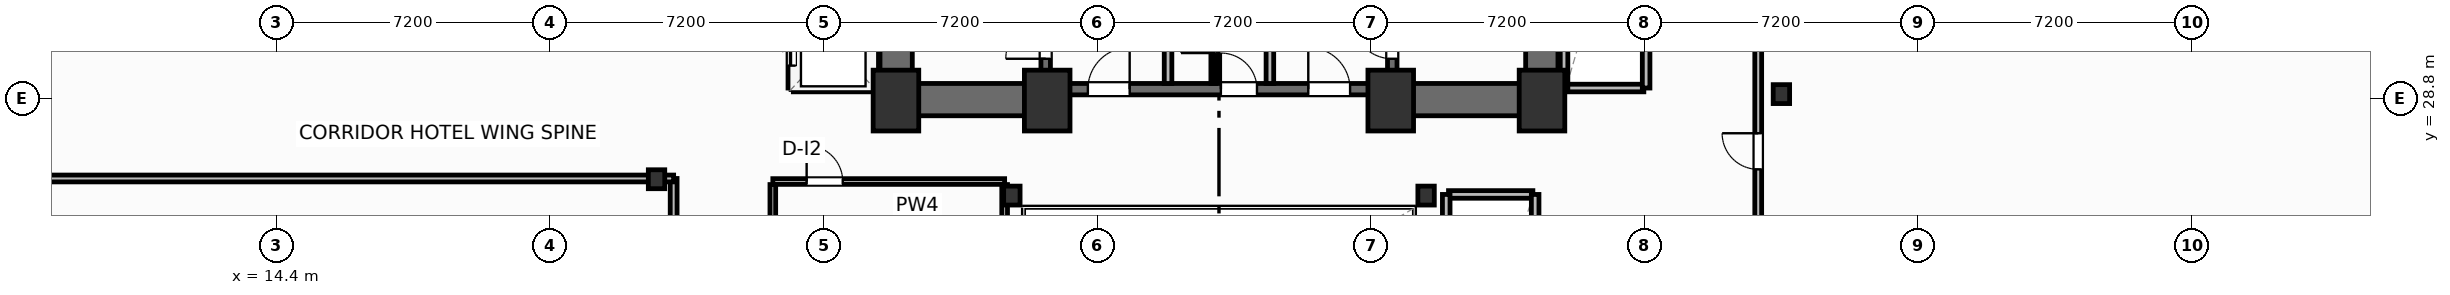
"""IFC4 building model, lengths in metres.
Left out: names, types, materials, properties, quantities, classifications, styles, units other than length and angle.
Written with IfcOpenShell. Run it as: python <this file> out.ifc"""

import sys

from ifc_helpers import new_model, si_unit, direction, frame, frame_2d, origin, origin_2d, place, context, subcontext, project, spatial, rectangle, i_section, extrude, element, fill, save


model = new_model("IFC4")
c1 = context("Model", 3, precision=1e-05, world=origin(), true_north=direction((0.0, 1.0)))
c2 = subcontext(c1, "Body", "Model", "MODEL_VIEW")
j1 = project(units=[si_unit("LENGTHUNIT", "METRE"), si_unit("PLANEANGLEUNIT", "RADIAN")], contexts=[c1])
p1 = place(None, origin())
s1 = spatial("IfcSite", under=j1, at=p1, CompositionType="ELEMENT")
p2 = place(p1, origin())
s2 = spatial("IfcBuilding", under=s1, at=p2, CompositionType="ELEMENT")
p3 = place(p2, frame((0.0, 0.0, 34.4)))
s3 = spatial("IfcBuildingStorey", under=s2, at=p3, CompositionType="ELEMENT", Elevation=34.4)
for number, where, z_axis, x_axis in (
    (1, (30.7, 28.75, 0.0), (0.0, 0.0, 1.0), (1.0, 0.0, 0.0)),
    (2, (34.68, 28.75, 0.0), (0.0, 0.0, 1.0), (1.0, 0.0, 0.0)),
    (3, (43.72, 28.75, 0.0), (0.0, 0.0, 1.0), (1.0, 0.0, 0.0)),
    (4, (47.7, 28.75, 0.0), (0.0, 0.0, 1.0), (1.0, 0.0, 0.0)),
):
    element("IfcColumn", number, at=place(p3, frame(where, z_axis=z_axis, x_axis=x_axis)), inside=s3, PredefinedType="COLUMN", context=c2, shape_type="SweptSolid", body=[
        extrude(rectangle(XDim=1.2, YDim=1.6, at=origin_2d()), origin(), (0.0, 0.0, 1.0), 3.7),
    ])
for number, where, z_axis, x_axis in (
    (5, (33.75, 26.25, 0.0), (0.0, 0.0, 1.0), (1.0, 0.0, 0.0)),
    (6, (44.65, 26.25, 0.0), (0.0, 0.0, 1.0), (1.0, 0.0, 0.0)),
    (7, (24.4, 26.68, 0.0), (0.0, 0.0, 1.0), (1.0, 0.0, 0.0)),
    (8, (54.0, 28.92, 0.0), (0.0, 0.0, 1.0), (1.0, 0.0, 0.0)),
):
    element("IfcColumn", number, at=place(p3, frame(where, z_axis=z_axis, x_axis=x_axis)), inside=s3, PredefinedType="COLUMN", context=c2, shape_type="SweptSolid", body=[
        extrude(i_section(OverallWidth=0.432, OverallDepth=0.498, WebThickness=0.056, FlangeThickness=0.089, FilletRadius=0.025, at=origin_2d()), origin(), (0.0, 0.0, 1.0), 3.7),
    ])
for number, where, z_axis, x_axis in (
    (9, (30.705, 29.2, 0.0), (0.0, 0.0, 1.0), (0.0, 1.0, 0.0)),
    (10, (47.695, 29.2, 0.0), (0.0, 0.0, 1.0), (0.0, 1.0, 0.0)),
):
    element("IfcWall", number, at=place(p3, frame(where, z_axis=z_axis, x_axis=x_axis)), inside=s3, PredefinedType="SHEAR", context=c2, shape_type="SweptSolid", body=[
        extrude(rectangle(XDim=9.22, YDim=0.85, at=frame_2d((4.61, 0.0))), origin(), (0.0, 0.0, 1.0), 3.45),
    ])
for number, where, z_axis, x_axis in (
    (11, (30.28, 28.775, 0.0), (0.0, 0.0, 1.0), (1.0, 0.0, 0.0)),
    (12, (43.6, 28.775, 0.0), (0.0, 0.0, 1.0), (1.0, 0.0, 0.0)),
):
    element("IfcWall", number, at=place(p3, frame(where, z_axis=z_axis, x_axis=x_axis)), inside=s3, PredefinedType="SHEAR", context=c2, shape_type="SweptSolid", body=[
        extrude(rectangle(XDim=4.52, YDim=0.85, at=frame_2d((2.26, 0.0))), origin(), (0.0, 0.0, 1.0), 3.45),
    ])
p4 = place(p3, frame((34.8, 29.05, 0.0), z_axis=(0.0, 0.0, 1.0), x_axis=(1.0, 0.0, 0.0)))
e13 = element("IfcWall", 13, at=p4, inside=s3, PredefinedType="SHEAR", context=c2, shape_type="SweptSolid", body=[
    extrude(rectangle(XDim=8.8, YDim=0.3, at=frame_2d((4.4, 0.0))), origin(), (0.0, 0.0, 1.0), 3.45),
])
p5 = place(p4, frame((0.95, 0.0, 0.0)))
e14 = element("IfcOpeningElement", 14, at=p5, cuts=e13, PredefinedType="OPENING", context=c2, shape_type="SweptSolid", body=[
    extrude(rectangle(XDim=1.1, YDim=2.15, at=frame_2d((0.55, 1.075))), frame((0.0, 0.16, 0.0), z_axis=(0.0, -1.0, 0.0), x_axis=(1.0, 0.0, 0.0)), (0.0, 0.0, 1.0), 0.32),
])
p6 = place(p4, frame((6.75, 0.0, 0.0)))
e15 = element("IfcOpeningElement", 15, at=p6, cuts=e13, PredefinedType="OPENING", context=c2, shape_type="SweptSolid", body=[
    extrude(rectangle(XDim=1.1, YDim=2.15, at=frame_2d((0.55, 1.075))), frame((0.0, 0.16, 0.0), z_axis=(0.0, -1.0, 0.0), x_axis=(1.0, 0.0, 0.0)), (0.0, 0.0, 1.0), 0.32),
])
p7 = place(p4, frame((4.45, 0.0, 0.0)))
e16 = element("IfcOpeningElement", 16, at=p7, cuts=e13, PredefinedType="OPENING", context=c2, shape_type="SweptSolid", body=[
    extrude(rectangle(XDim=0.95, YDim=2.15, at=frame_2d((0.475, 1.075))), frame((0.0, 0.16, 0.0), z_axis=(0.0, -1.0, 0.0), x_axis=(1.0, 0.0, 0.0)), (0.0, 0.0, 1.0), 0.32),
])
p8 = place(p3, frame((34.64, 29.2, 0.0), z_axis=(0.0, 0.0, 1.0), x_axis=(0.0, 1.0, 0.0)))
e17 = element("IfcWall", 17, at=p8, inside=s3, PredefinedType="SHEAR", context=c2, shape_type="SweptSolid", body=[
    extrude(rectangle(XDim=9.22, YDim=0.25, at=frame_2d((4.61, 0.0))), origin(), (0.0, 0.0, 1.0), 3.45),
])
p9 = place(p8, frame((0.65, 0.0, 0.0)))
e18 = element("IfcOpeningElement", 18, at=p9, cuts=e17, PredefinedType="OPENING", context=c2, shape_type="SweptSolid", body=[
    extrude(rectangle(XDim=1.05, YDim=2.15, at=frame_2d((0.525, 1.075))), frame((0.0, 0.135, 0.0), z_axis=(0.0, -1.0, 0.0), x_axis=(1.0, 0.0, 0.0)), (0.0, 0.0, 1.0), 0.27),
])
p10 = place(p3, frame((43.76, 29.2, 0.0), z_axis=(0.0, 0.0, 1.0), x_axis=(0.0, 1.0, 0.0)))
e19 = element("IfcWall", 19, at=p10, inside=s3, PredefinedType="SHEAR", context=c2, shape_type="SweptSolid", body=[
    extrude(rectangle(XDim=9.22, YDim=0.25, at=frame_2d((4.61, 0.0))), origin(), (0.0, 0.0, 1.0), 3.45),
])
p11 = place(p10, frame((0.65, 0.0, 0.0)))
e20 = element("IfcOpeningElement", 20, at=p11, cuts=e19, PredefinedType="OPENING", context=c2, shape_type="SweptSolid", body=[
    extrude(rectangle(XDim=1.05, YDim=2.15, at=frame_2d((0.525, 1.075))), frame((0.0, 0.135, 0.0), z_axis=(0.0, -1.0, 0.0), x_axis=(1.0, 0.0, 0.0)), (0.0, 0.0, 1.0), 0.27),
])
p12 = place(p3, frame((81.127, 26.995, 0.0), z_axis=(0.0, 0.0, 1.0), x_axis=(-0.823530169317, 0.567272474411, 0.0)))
e21 = element("IfcWall", 21, at=p12, inside=s3, PredefinedType="SOLIDWALL", context=c2, shape_type="SweptSolid", body=[
    extrude(rectangle(XDim=23.247, YDim=0.22, at=frame_2d((11.624, 0.0))), origin(), (0.0, 0.0, 1.0), 2.73),
])
p13 = place(p12, frame((10.799, 0.0, 0.8)))
e22 = element("IfcOpeningElement", 22, at=p13, cuts=e21, PredefinedType="OPENING", context=c2, shape_type="SweptSolid", body=[
    extrude(rectangle(XDim=1.65, YDim=1.65, at=frame_2d((0.825, 0.825))), frame((0.0, 0.12, 0.0), z_axis=(0.0, -1.0, 0.0), x_axis=(1.0, 0.0, 0.0)), (0.0, 0.0, 1.0), 0.24),
])
p14 = place(p3, frame((24.85, 19.2, 0.0), z_axis=(0.0, 0.0, 1.0), x_axis=(0.0, 1.0, 0.0)))
e23 = element("IfcWall", 23, at=p14, inside=s3, PredefinedType="PARTITIONING", context=c2, shape_type="SweptSolid", body=[
    extrude(rectangle(XDim=7.5, YDim=0.18, at=frame_2d((3.75, 0.0))), origin(), (0.0, 0.0, 1.0), 3.45),
])
p15 = place(p14, frame((3.275, 0.0, 0.0)))
e24 = element("IfcOpeningElement", 24, at=p15, cuts=e23, PredefinedType="OPENING", context=c2, shape_type="SweptSolid", body=[
    extrude(rectangle(XDim=0.95, YDim=2.05, at=frame_2d((0.475, 1.025))), frame((0.0, 0.1, 0.0), z_axis=(0.0, -1.0, 0.0), x_axis=(1.0, 0.0, 0.0)), (0.0, 0.0, 1.0), 0.2),
])
p16 = place(p3, frame((0.2, 26.7, 0.0), z_axis=(0.0, 0.0, 1.0), x_axis=(1.0, 0.0, 0.0)))
e25 = element("IfcWall", 25, at=p16, inside=s3, PredefinedType="PARTITIONING", context=c2, shape_type="SweptSolid", body=[
    extrude(rectangle(XDim=24.65, YDim=0.18, at=frame_2d((12.325, 0.0))), origin(), (0.0, 0.0, 1.0), 2.662),
])
p17 = place(p3, frame((53.39, 19.24, 0.0), z_axis=(0.0, 0.0, 1.0), x_axis=(0.0, 1.0, 0.0)))
e26 = element("IfcWall", 26, at=p17, inside=s3, PredefinedType="PARTITIONING", context=c2, shape_type="SweptSolid", body=[
    extrude(rectangle(XDim=20.06, YDim=0.18, at=frame_2d((10.03, 0.0))), origin(), (0.0, 0.0, 1.0), 3.45),
])
p18 = place(p17, frame((7.7, 0.0, 0.0)))
e27 = element("IfcOpeningElement", 27, at=p18, cuts=e26, PredefinedType="OPENING", context=c2, shape_type="SweptSolid", body=[
    extrude(rectangle(XDim=0.95, YDim=2.05, at=frame_2d((0.475, 1.025))), frame((0.0, 0.1, 0.0), z_axis=(0.0, -1.0, 0.0), x_axis=(1.0, 0.0, 0.0)), (0.0, 0.0, 1.0), 0.2),
])
for number, where, z_axis, x_axis in (
    (28, (37.86, 29.2, 0.0), (0.0, 0.0, 1.0), (0.0, 1.0, 0.0)),
    (29, (40.54, 29.2, 0.0), (0.0, 0.0, 1.0), (0.0, 1.0, 0.0)),
):
    element("IfcWall", number, at=place(p3, frame(where, z_axis=z_axis, x_axis=x_axis)), inside=s3, PredefinedType="PARTITIONING", context=c2, shape_type="SweptSolid", body=[
        extrude(rectangle(XDim=5.18, YDim=0.2, at=frame_2d((2.59, 0.0))), origin(), (0.0, 0.0, 1.0), 3.45),
    ])
p19 = place(p3, frame((39.05, 29.2, 0.0), z_axis=(0.0, 0.0, 1.0), x_axis=(0.0, 1.0, 0.0)))
e30 = element("IfcWall", 30, at=p19, inside=s3, PredefinedType="PARTITIONING", context=c2, shape_type="SweptSolid", body=[
    extrude(rectangle(XDim=5.22, YDim=0.125, at=frame_2d((2.61, 0.0))), origin(), (0.0, 0.0, 1.0), 3.45),
])
p20 = place(p19, frame((0.8, 0.0, 0.0)))
e31 = element("IfcOpeningElement", 31, at=p20, cuts=e30, PredefinedType="OPENING", context=c2, shape_type="SweptSolid", body=[
    extrude(rectangle(XDim=0.85, YDim=2.05, at=frame_2d((0.425, 1.025))), frame((0.0, 0.073, 0.0), z_axis=(0.0, -1.0, 0.0), x_axis=(1.0, 0.0, 0.0)), (0.0, 0.0, 1.0), 0.145),
])
p21 = place(p19, frame((3.4, 0.0, 0.0)))
e32 = element("IfcOpeningElement", 32, at=p21, cuts=e30, PredefinedType="OPENING", context=c2, shape_type="SweptSolid", body=[
    extrude(rectangle(XDim=0.85, YDim=2.05, at=frame_2d((0.425, 1.025))), frame((0.0, 0.073, 0.0), z_axis=(0.0, -1.0, 0.0), x_axis=(1.0, 0.0, 0.0)), (0.0, 0.0, 1.0), 0.145),
])
p22 = place(p3, frame((27.46, 26.62, 0.0), z_axis=(0.0, 0.0, 1.0), x_axis=(1.0, 0.0, 0.0)))
e33 = element("IfcWall", 33, at=p22, inside=s3, PredefinedType="PARTITIONING", context=c2, shape_type="SweptSolid", body=[
    extrude(rectangle(XDim=6.1, YDim=0.15, at=frame_2d((3.05, 0.0))), origin(), (0.0, 0.0, 1.0), 2.662),
])
p23 = place(p22, frame((0.89, 0.0, 0.0)))
e34 = element("IfcOpeningElement", 34, at=p23, cuts=e33, PredefinedType="OPENING", context=c2, shape_type="SweptSolid", body=[
    extrude(rectangle(XDim=0.95, YDim=2.05, at=frame_2d((0.475, 1.025))), frame((0.0, 0.085, 0.0), z_axis=(0.0, -1.0, 0.0), x_axis=(1.0, 0.0, 0.0)), (0.0, 0.0, 1.0), 0.17),
])
p24 = place(p3, frame((27.46, 19.38, 0.0), z_axis=(0.0, 0.0, 1.0), x_axis=(0.0, 1.0, 0.0)))
e35 = element("IfcWall", 35, at=p24, inside=s3, PredefinedType="PARTITIONING", context=c2, shape_type="SweptSolid", body=[
    extrude(rectangle(XDim=7.16, YDim=0.15, at=frame_2d((3.58, 0.0))), origin(), (0.0, 0.0, 1.0), 3.45),
])
p25 = place(p24, frame((1.1, 0.0, 0.0)))
e36 = element("IfcOpeningElement", 36, at=p25, cuts=e35, PredefinedType="OPENING", context=c2, shape_type="SweptSolid", body=[
    extrude(rectangle(XDim=0.9, YDim=2.05, at=frame_2d((0.45, 1.025))), frame((0.0, 0.085, 0.0), z_axis=(0.0, -1.0, 0.0), x_axis=(1.0, 0.0, 0.0)), (0.0, 0.0, 1.0), 0.17),
])
p26 = place(p3, frame((33.56, 19.38, 0.0), z_axis=(0.0, 0.0, 1.0), x_axis=(0.0, 1.0, 0.0)))
e37 = element("IfcWall", 37, at=p26, inside=s3, PredefinedType="PARTITIONING", context=c2, shape_type="SweptSolid", body=[
    extrude(rectangle(XDim=7.16, YDim=0.15, at=frame_2d((3.58, 0.0))), origin(), (0.0, 0.0, 1.0), 2.824),
])
p27 = place(p3, frame((28.0, 29.08, 0.0), z_axis=(0.0, 0.0, 1.0), x_axis=(1.0, 0.0, 0.0)))
e38 = element("IfcWall", 38, at=p27, inside=s3, PredefinedType="PARTITIONING", context=c2, shape_type="SweptSolid", body=[
    extrude(rectangle(XDim=2.1, YDim=0.2, at=frame_2d((1.05, 0.0))), origin(), (0.0, 0.0, 1.0), 3.45),
])
p28 = place(p3, frame((30.12, 29.08, 0.0), z_axis=(0.0, 0.0, 1.0), x_axis=(0.0, 1.0, 0.0)))
e39 = element("IfcWall", 39, at=p28, inside=s3, PredefinedType="PARTITIONING", context=c2, shape_type="SweptSolid", body=[
    extrude(rectangle(XDim=6.89, YDim=0.2, at=frame_2d((3.445, 0.0))), origin(), (0.0, 0.0, 1.0), 3.45),
])
p29 = place(p3, frame((27.96, 29.08, 0.0), z_axis=(0.0, 0.0, 1.0), x_axis=(0.0, 1.0, 0.0)))
e40 = element("IfcWall", 40, at=p29, inside=s3, PredefinedType="PARTITIONING", context=c2, shape_type="SweptSolid", body=[
    extrude(rectangle(XDim=6.89, YDim=0.2, at=frame_2d((3.445, 0.0))), origin(), (0.0, 0.0, 1.0), 3.45),
])
p30 = place(p29, frame((0.59, 0.0, 0.0)))
e41 = element("IfcOpeningElement", 41, at=p30, cuts=e40, PredefinedType="OPENING", context=c2, shape_type="SweptSolid", body=[
    extrude(rectangle(XDim=1.1, YDim=2.15, at=frame_2d((0.55, 1.075))), frame((0.0, 0.11, 0.0), z_axis=(0.0, -1.0, 0.0), x_axis=(1.0, 0.0, 0.0)), (0.0, 0.0, 1.0), 0.22),
])
p31 = place(p29, frame((2.89, 0.0, 0.0)))
e42 = element("IfcOpeningElement", 42, at=p31, cuts=e40, PredefinedType="OPENING", context=c2, shape_type="SweptSolid", body=[
    extrude(rectangle(XDim=1.1, YDim=2.15, at=frame_2d((0.55, 1.075))), frame((0.0, 0.11, 0.0), z_axis=(0.0, -1.0, 0.0), x_axis=(1.0, 0.0, 0.0)), (0.0, 0.0, 1.0), 0.22),
])
p32 = place(p29, frame((5.19, 0.0, 0.0)))
e43 = element("IfcOpeningElement", 43, at=p32, cuts=e40, PredefinedType="OPENING", context=c2, shape_type="SweptSolid", body=[
    extrude(rectangle(XDim=1.1, YDim=2.15, at=frame_2d((0.55, 1.075))), frame((0.0, 0.11, 0.0), z_axis=(0.0, -1.0, 0.0), x_axis=(1.0, 0.0, 0.0)), (0.0, 0.0, 1.0), 0.22),
])
p33 = place(p3, frame((48.32, 29.08, 0.0), z_axis=(0.0, 0.0, 1.0), x_axis=(1.0, 0.0, 0.0)))
e44 = element("IfcWall", 44, at=p33, inside=s3, PredefinedType="PARTITIONING", context=c2, shape_type="SweptSolid", body=[
    extrude(rectangle(XDim=2.06, YDim=0.2, at=frame_2d((1.03, 0.0))), origin(), (0.0, 0.0, 1.0), 2.662),
])
for number, where, z_axis, x_axis in (
    (45, (48.28, 29.08, 0.0), (0.0, 0.0, 1.0), (0.0, 1.0, 0.0)),
    (46, (50.44, 29.08, 0.0), (0.0, 0.0, 1.0), (0.0, 1.0, 0.0)),
):
    element("IfcWall", number, at=place(p3, frame(where, z_axis=z_axis, x_axis=x_axis)), inside=s3, PredefinedType="PARTITIONING", context=c2, shape_type="SweptSolid", body=[
        extrude(rectangle(XDim=6.89, YDim=0.2, at=frame_2d((3.445, 0.0))), origin(), (0.0, 0.0, 1.0), 3.45),
    ])
p34 = place(p3, frame((45.24, 26.28, 0.0), z_axis=(0.0, 0.0, 1.0), x_axis=(1.0, 0.0, 0.0)))
e47 = element("IfcWall", 47, at=p34, inside=s3, PredefinedType="PARTITIONING", context=c2, shape_type="SweptSolid", body=[
    extrude(rectangle(XDim=2.22, YDim=0.2, at=frame_2d((1.11, 0.0))), origin(), (0.0, 0.0, 1.0), 3.45),
])
for number, where, z_axis, x_axis in (
    (48, (45.18, 19.38, 0.0), (0.0, 0.0, 1.0), (0.0, 1.0, 0.0)),
    (49, (47.52, 19.38, 0.0), (0.0, 0.0, 1.0), (0.0, 1.0, 0.0)),
):
    element("IfcWall", number, at=place(p3, frame(where, z_axis=z_axis, x_axis=x_axis)), inside=s3, PredefinedType="PARTITIONING", context=c2, shape_type="SweptSolid", body=[
        extrude(rectangle(XDim=6.9, YDim=0.2, at=frame_2d((3.45, 0.0))), origin(), (0.0, 0.0, 1.0), 3.45),
    ])
p35 = place(p18, origin())
e50 = element("IfcDoor", 50, at=p35, inside=s3, OperationType="SINGLE_SWING_RIGHT", PredefinedType="DOOR", context=c2, shape_type="SweptSolid", body=[
    extrude(rectangle(XDim=0.95, YDim=2.05, at=frame_2d((0.475, 1.025))), frame((0.0, 0.025, 0.0), z_axis=(0.0, -1.0, 0.0), x_axis=(1.0, 0.0, 0.0)), (0.0, 0.0, 1.0), 0.05),
])
fill(e27, e50)
p36 = place(p9, origin())
e51 = element("IfcDoor", 51, at=p36, inside=s3, OperationType="SINGLE_SWING_LEFT", PredefinedType="DOOR", context=c2, shape_type="SweptSolid", body=[
    extrude(rectangle(XDim=1.05, YDim=2.15, at=frame_2d((0.525, 1.075))), frame((0.0, 0.025, 0.0), z_axis=(0.0, -1.0, 0.0), x_axis=(1.0, 0.0, 0.0)), (0.0, 0.0, 1.0), 0.05),
])
fill(e18, e51)
p37 = place(p11, origin())
e52 = element("IfcDoor", 52, at=p37, inside=s3, OperationType="SINGLE_SWING_RIGHT", PredefinedType="DOOR", context=c2, shape_type="SweptSolid", body=[
    extrude(rectangle(XDim=1.05, YDim=2.15, at=frame_2d((0.525, 1.075))), frame((0.0, 0.025, 0.0), z_axis=(0.0, -1.0, 0.0), x_axis=(1.0, 0.0, 0.0)), (0.0, 0.0, 1.0), 0.05),
])
fill(e20, e52)
p38 = place(p5, origin())
e53 = element("IfcDoor", 53, at=p38, inside=s3, OperationType="SINGLE_SWING_RIGHT", PredefinedType="DOOR", context=c2, shape_type="SweptSolid", body=[
    extrude(rectangle(XDim=1.1, YDim=2.15, at=frame_2d((0.55, 1.075))), frame((0.0, 0.025, 0.0), z_axis=(0.0, -1.0, 0.0), x_axis=(1.0, 0.0, 0.0)), (0.0, 0.0, 1.0), 0.05),
])
fill(e14, e53)
p39 = place(p6, origin())
e54 = element("IfcDoor", 54, at=p39, inside=s3, OperationType="SINGLE_SWING_LEFT", PredefinedType="DOOR", context=c2, shape_type="SweptSolid", body=[
    extrude(rectangle(XDim=1.1, YDim=2.15, at=frame_2d((0.55, 1.075))), frame((0.0, 0.025, 0.0), z_axis=(0.0, -1.0, 0.0), x_axis=(1.0, 0.0, 0.0)), (0.0, 0.0, 1.0), 0.05),
])
fill(e15, e54)
p40 = place(p20, origin())
e55 = element("IfcDoor", 55, at=p40, inside=s3, OperationType="SINGLE_SWING_LEFT", PredefinedType="DOOR", context=c2, shape_type="SweptSolid", body=[
    extrude(rectangle(XDim=0.85, YDim=2.05, at=frame_2d((0.425, 1.025))), frame((0.0, 0.025, 0.0), z_axis=(0.0, -1.0, 0.0), x_axis=(1.0, 0.0, 0.0)), (0.0, 0.0, 1.0), 0.05),
])
fill(e31, e55)
p41 = place(p7, origin())
e56 = element("IfcDoor", 56, at=p41, inside=s3, OperationType="SINGLE_SWING_LEFT", PredefinedType="DOOR", context=c2, shape_type="SweptSolid", body=[
    extrude(rectangle(XDim=0.95, YDim=2.15, at=frame_2d((0.475, 1.075))), frame((0.0, 0.025, 0.0), z_axis=(0.0, -1.0, 0.0), x_axis=(1.0, 0.0, 0.0)), (0.0, 0.0, 1.0), 0.05),
])
fill(e16, e56)
p42 = place(p23, origin())
e57 = element("IfcDoor", 57, at=p42, inside=s3, OperationType="SINGLE_SWING_LEFT", PredefinedType="DOOR", context=c2, shape_type="SweptSolid", body=[
    extrude(rectangle(XDim=0.95, YDim=2.05, at=frame_2d((0.475, 1.025))), frame((0.0, 0.025, 0.0), z_axis=(0.0, -1.0, 0.0), x_axis=(1.0, 0.0, 0.0)), (0.0, 0.0, 1.0), 0.05),
])
fill(e34, e57)
p43 = place(p30, origin())
e58 = element("IfcDoor", 58, at=p43, inside=s3, OperationType="SLIDING_TO_LEFT", PredefinedType="DOOR", context=c2, shape_type="SweptSolid", body=[
    extrude(rectangle(XDim=1.1, YDim=2.15, at=frame_2d((0.55, 1.075))), frame((0.0, 0.025, 0.0), z_axis=(0.0, -1.0, 0.0), x_axis=(1.0, 0.0, 0.0)), (0.0, 0.0, 1.0), 0.05),
])
fill(e41, e58)
save(model, sys.argv[1])
